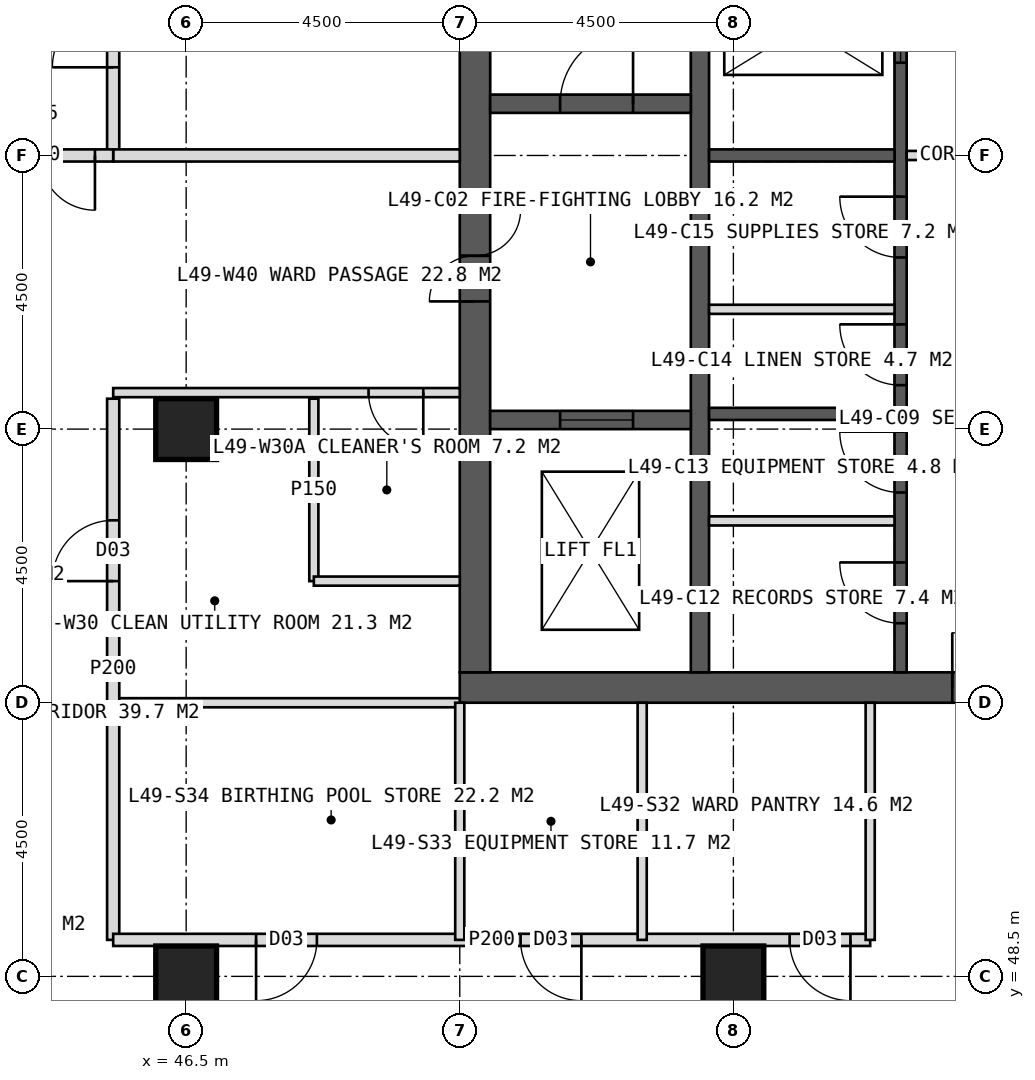
"""IFC4 building model, lengths in metres.
Left out: names, types, materials, properties, quantities, classifications, styles, units other than length and angle.
Written with IfcOpenShell. Run it as: python <this file> out.ifc"""

import sys

from ifc_helpers import new_model, si_unit, direction, frame, frame_2d, origin, origin_2d, place, context, subcontext, project, spatial, rectangle, hollow_rectangle, extrude, element, fill, save


model = new_model("IFC4")
c1 = context("Model", 3, precision=1e-05, world=origin(), true_north=direction((0.0, 1.0)))
c2 = subcontext(c1, "Body", "Model", "MODEL_VIEW")
j1 = project(units=[si_unit("LENGTHUNIT", "METRE"), si_unit("PLANEANGLEUNIT", "RADIAN")], contexts=[c1])
p1 = place(None, origin())
s1 = spatial("IfcSite", under=j1, at=p1, CompositionType="ELEMENT")
p2 = place(p1, origin())
s2 = spatial("IfcBuilding", under=s1, at=p2, CompositionType="ELEMENT")
p3 = place(p2, frame((0.0, 0.0, 205.0)))
s3 = spatial("IfcBuildingStorey", under=s2, at=p3, CompositionType="ELEMENT", Elevation=205.0)
p4 = place(p3, frame((51.0, 53.25, 0.0), z_axis=(0.0, 0.0, 1.0), x_axis=(1.0, 0.0, 0.0)))
e1 = element("IfcWall", 1, at=p4, inside=s3, PredefinedType="SHEAR", context=c2, shape_type="SweptSolid", body=[
    extrude(rectangle(XDim=18.0, YDim=0.5, at=frame_2d((9.0, 0.0))), origin(), (0.0, 0.0, 1.0), 4.0),
])
p5 = place(p4, frame((8.1, 0.0, 0.0)))
e2 = element("IfcOpeningElement", 2, at=p5, cuts=e1, PredefinedType="OPENING", context=c2, shape_type="SweptSolid", body=[
    extrude(rectangle(XDim=1.8, YDim=2.2, at=frame_2d((0.9, 1.1))), frame((0.0, 0.26, 0.0), z_axis=(0.0, -1.0, 0.0), x_axis=(1.0, 0.0, 0.0)), (0.0, 0.0, 1.0), 0.52),
])
p6 = place(p3, frame((51.25, 53.5, 0.0), z_axis=(0.0, 0.0, 1.0), x_axis=(0.0, 1.0, 0.0)))
e3 = element("IfcWall", 3, at=p6, inside=s3, PredefinedType="SHEAR", context=c2, shape_type="SweptSolid", body=[
    extrude(rectangle(XDim=17.0, YDim=0.5, at=frame_2d((8.5, 0.0))), origin(), (0.0, 0.0, 1.0), 4.0),
])
p7 = place(p6, frame((6.1, 0.0, 0.0)))
e4 = element("IfcOpeningElement", 4, at=p7, cuts=e3, PredefinedType="OPENING", context=c2, shape_type="SweptSolid", body=[
    extrude(rectangle(XDim=1.5, YDim=2.2, at=frame_2d((0.75, 1.1))), frame((0.0, 0.26, 0.0), z_axis=(0.0, -1.0, 0.0), x_axis=(1.0, 0.0, 0.0)), (0.0, 0.0, 1.0), 0.52),
])
p8 = place(p3, frame((54.95, 53.5, 0.0), z_axis=(0.0, 0.0, 1.0), x_axis=(0.0, 1.0, 0.0)))
e5 = element("IfcWall", 5, at=p8, inside=s3, PredefinedType="SHEAR", context=c2, shape_type="SweptSolid", body=[
    extrude(rectangle(XDim=17.0, YDim=0.3, at=frame_2d((8.5, 0.0))), origin(), (0.0, 0.0, 1.0), 4.0),
])
p9 = place(p3, frame((58.25, 53.5, 0.0), z_axis=(0.0, 0.0, 1.0), x_axis=(0.0, 1.0, 0.0)))
e6 = element("IfcWall", 6, at=p9, inside=s3, PredefinedType="SHEAR", context=c2, shape_type="SweptSolid", body=[
    extrude(rectangle(XDim=17.0, YDim=0.2, at=frame_2d((8.5, 0.0))), origin(), (0.0, 0.0, 1.0), 4.0),
])
p10 = place(p9, frame((0.808, 0.0, 0.0)))
e7 = element("IfcOpeningElement", 7, at=p10, cuts=e6, PredefinedType="OPENING", context=c2, shape_type="SweptSolid", body=[
    extrude(rectangle(XDim=1.0, YDim=2.1, at=frame_2d((0.5, 1.05))), frame((0.0, 0.11, 0.0), z_axis=(0.0, -1.0, 0.0), x_axis=(1.0, 0.0, 0.0)), (0.0, 0.0, 1.0), 0.22),
])
p11 = place(p9, frame((2.958, 0.0, 0.0)))
e8 = element("IfcOpeningElement", 8, at=p11, cuts=e6, PredefinedType="OPENING", context=c2, shape_type="SweptSolid", body=[
    extrude(rectangle(XDim=1.0, YDim=2.1, at=frame_2d((0.5, 1.05))), frame((0.0, 0.11, 0.0), z_axis=(0.0, -1.0, 0.0), x_axis=(1.0, 0.0, 0.0)), (0.0, 0.0, 1.0), 0.22),
])
p12 = place(p9, frame((4.722, 0.0, 0.0)))
e9 = element("IfcOpeningElement", 9, at=p12, cuts=e6, PredefinedType="OPENING", context=c2, shape_type="SweptSolid", body=[
    extrude(rectangle(XDim=1.0, YDim=2.1, at=frame_2d((0.5, 1.05))), frame((0.0, 0.11, 0.0), z_axis=(0.0, -1.0, 0.0), x_axis=(1.0, 0.0, 0.0)), (0.0, 0.0, 1.0), 0.22),
])
p13 = place(p9, frame((6.823, 0.0, 0.0)))
e10 = element("IfcOpeningElement", 10, at=p13, cuts=e6, PredefinedType="OPENING", context=c2, shape_type="SweptSolid", body=[
    extrude(rectangle(XDim=1.0, YDim=2.1, at=frame_2d((0.5, 1.05))), frame((0.0, 0.11, 0.0), z_axis=(0.0, -1.0, 0.0), x_axis=(1.0, 0.0, 0.0)), (0.0, 0.0, 1.0), 0.22),
])
p14 = place(p9, frame((10.025, 0.0, 0.0)))
e11 = element("IfcOpeningElement", 11, at=p14, cuts=e6, PredefinedType="OPENING", context=c2, shape_type="SweptSolid", body=[
    extrude(rectangle(XDim=1.4, YDim=2.2, at=frame_2d((0.7, 1.1))), frame((0.0, 0.11, 0.0), z_axis=(0.0, -1.0, 0.0), x_axis=(1.0, 0.0, 0.0)), (0.0, 0.0, 1.0), 0.22),
])
p15 = place(p9, frame((14.325, 0.0, 0.0)))
e12 = element("IfcOpeningElement", 12, at=p15, cuts=e6, PredefinedType="OPENING", context=c2, shape_type="SweptSolid", body=[
    extrude(rectangle(XDim=1.4, YDim=2.2, at=frame_2d((0.7, 1.1))), frame((0.0, 0.11, 0.0), z_axis=(0.0, -1.0, 0.0), x_axis=(1.0, 0.0, 0.0)), (0.0, 0.0, 1.0), 0.22),
])
for number, where, z_axis, x_axis in (
    (13, (55.1, 57.75, 0.0), (0.0, 0.0, 1.0), (1.0, 0.0, 0.0)),
    (14, (55.1, 62.0, 0.0), (0.0, 0.0, 1.0), (1.0, 0.0, 0.0)),
):
    element("IfcWall", number, at=place(p3, frame(where, z_axis=z_axis, x_axis=x_axis)), inside=s3, PredefinedType="SHEAR", context=c2, shape_type="SweptSolid", body=[
        extrude(rectangle(XDim=3.05, YDim=0.2, at=frame_2d((1.525, 0.0))), origin(), (0.0, 0.0, 1.0), 4.0),
    ])
p16 = place(p3, frame((51.5, 62.85, 0.0), z_axis=(0.0, 0.0, 1.0), x_axis=(1.0, 0.0, 0.0)))
e15 = element("IfcWall", 15, at=p16, inside=s3, PredefinedType="SHEAR", context=c2, shape_type="SweptSolid", body=[
    extrude(rectangle(XDim=3.3, YDim=0.3, at=frame_2d((1.65, 0.0))), origin(), (0.0, 0.0, 1.0), 4.0),
])
p17 = place(p16, frame((1.15, 0.0, 0.0)))
e16 = element("IfcOpeningElement", 16, at=p17, cuts=e15, PredefinedType="OPENING", context=c2, shape_type="SweptSolid", body=[
    extrude(rectangle(XDim=1.2, YDim=2.1, at=frame_2d((0.6, 1.05))), frame((0.0, 0.16, 0.0), z_axis=(0.0, -1.0, 0.0), x_axis=(1.0, 0.0, 0.0)), (0.0, 0.0, 1.0), 0.32),
])
p18 = place(p3, frame((51.5, 57.65, 0.0), z_axis=(0.0, 0.0, 1.0), x_axis=(1.0, 0.0, 0.0)))
e17 = element("IfcWall", 17, at=p18, inside=s3, PredefinedType="SHEAR", context=c2, shape_type="SweptSolid", body=[
    extrude(rectangle(XDim=3.3, YDim=0.3, at=frame_2d((1.65, 0.0))), origin(), (0.0, 0.0, 1.0), 4.0),
])
p19 = place(p18, frame((1.15, 0.0, 0.0)))
e18 = element("IfcOpeningElement", 18, at=p19, cuts=e17, PredefinedType="OPENING", context=c2, shape_type="SweptSolid", body=[
    extrude(rectangle(XDim=1.2, YDim=2.2, at=frame_2d((0.6, 1.1))), frame((0.0, 0.16, 0.0), z_axis=(0.0, -1.0, 0.0), x_axis=(1.0, 0.0, 0.0)), (0.0, 0.0, 1.0), 0.32),
])
for number, where, z_axis, x_axis in (
    (19, (46.5, 48.5, 0.0), (0.0, 0.0, 1.0), (1.0, 0.0, 0.0)),
    (20, (55.5, 48.5, 0.0), (0.0, 0.0, 1.0), (1.0, 0.0, 0.0)),
    (21, (46.5, 57.5, 0.0), (0.0, 0.0, 1.0), (1.0, 0.0, 0.0)),
):
    element("IfcColumn", number, at=place(p3, frame(where, z_axis=z_axis, x_axis=x_axis)), inside=s3, PredefinedType="COLUMN", context=c2, shape_type="SweptSolid", body=[
        extrude(hollow_rectangle(XDim=1.0, YDim=1.0, WallThickness=0.1, at=origin_2d()), origin(), (0.0, 0.0, 1.0), 4.0),
    ])
p20 = place(p3, frame((51.0, 53.0, 0.0), z_axis=(0.0, 0.0, 1.0), x_axis=(-1.0, 0.0, 0.0)))
e22 = element("IfcWall", 22, at=p20, inside=s3, PredefinedType="PARTITIONING", context=c2, shape_type="SweptSolid", body=[
    extrude(rectangle(XDim=5.7, YDim=0.15, at=frame_2d((2.85, 0.0))), origin(), (0.0, 0.0, 1.0), 3.75),
])
p21 = place(p3, frame((45.3, 49.1, 0.0), z_axis=(0.0, 0.0, 1.0), x_axis=(0.0, 1.0, 0.0)))
e23 = element("IfcWall", 23, at=p21, inside=s3, PredefinedType="PARTITIONING", context=c2, shape_type="SweptSolid", body=[
    extrude(rectangle(XDim=8.9, YDim=0.2, at=frame_2d((4.45, 0.0))), origin(), (0.0, 0.0, 1.0), 3.75),
])
p22 = place(p21, frame((5.9, 0.0, 0.0)))
e24 = element("IfcOpeningElement", 24, at=p22, cuts=e23, PredefinedType="OPENING", context=c2, shape_type="SweptSolid", body=[
    extrude(rectangle(XDim=1.0, YDim=2.1, at=frame_2d((0.5, 1.05))), frame((0.0, 0.11, 0.0), z_axis=(0.0, -1.0, 0.0), x_axis=(1.0, 0.0, 0.0)), (0.0, 0.0, 1.0), 0.22),
])
p23 = place(p3, frame((45.3, 62.0, 0.0), z_axis=(0.0, 0.0, 1.0), x_axis=(0.0, 1.0, 0.0)))
e25 = element("IfcWall", 25, at=p23, inside=s3, PredefinedType="PARTITIONING", context=c2, shape_type="SweptSolid", body=[
    extrude(rectangle(XDim=14.7, YDim=0.2, at=frame_2d((7.35, 0.0))), origin(), (0.0, 0.0, 1.0), 3.75),
])
p24 = place(p23, frame((1.45, 0.0, 0.0)))
e26 = element("IfcOpeningElement", 26, at=p24, cuts=e25, PredefinedType="OPENING", context=c2, shape_type="SweptSolid", body=[
    extrude(rectangle(XDim=1.0, YDim=2.1, at=frame_2d((0.5, 1.05))), frame((0.0, 0.11, 0.0), z_axis=(0.0, -1.0, 0.0), x_axis=(1.0, 0.0, 0.0)), (0.0, 0.0, 1.0), 0.22),
])
p25 = place(p23, frame((11.35, 0.0, 0.0)))
e27 = element("IfcOpeningElement", 27, at=p25, cuts=e25, PredefinedType="OPENING", context=c2, shape_type="SweptSolid", body=[
    extrude(rectangle(XDim=1.0, YDim=2.1, at=frame_2d((0.5, 1.05))), frame((0.0, 0.11, 0.0), z_axis=(0.0, -1.0, 0.0), x_axis=(1.0, 0.0, 0.0)), (0.0, 0.0, 1.0), 0.22),
])
p26 = place(p3, frame((51.0, 58.1, 0.0), z_axis=(0.0, 0.0, 1.0), x_axis=(-1.0, 0.0, 0.0)))
e28 = element("IfcWall", 28, at=p26, inside=s3, PredefinedType="PARTITIONING", context=c2, shape_type="SweptSolid", body=[
    extrude(rectangle(XDim=5.7, YDim=0.15, at=frame_2d((2.85, 0.0))), origin(), (0.0, 0.0, 1.0), 3.75),
])
p27 = place(p26, frame((0.6, 0.0, 0.0)))
e29 = element("IfcOpeningElement", 29, at=p27, cuts=e28, PredefinedType="OPENING", context=c2, shape_type="SweptSolid", body=[
    extrude(rectangle(XDim=0.9, YDim=2.1, at=frame_2d((0.45, 1.05))), frame((0.0, 0.085, 0.0), z_axis=(0.0, -1.0, 0.0), x_axis=(1.0, 0.0, 0.0)), (0.0, 0.0, 1.0), 0.17),
])
p28 = place(p3, frame((51.0, 62.0, 0.0), z_axis=(0.0, 0.0, 1.0), x_axis=(-1.0, 0.0, 0.0)))
e30 = element("IfcWall", 30, at=p28, inside=s3, PredefinedType="SOLIDWALL", context=c2, shape_type="SweptSolid", body=[
    extrude(rectangle(XDim=5.7, YDim=0.2, at=frame_2d((2.85, 0.0))), origin(), (0.0, 0.0, 1.0), 2.95),
])
p29 = place(p3, frame((48.6, 55.0, 0.0), z_axis=(0.0, 0.0, 1.0), x_axis=(0.0, 1.0, 0.0)))
e31 = element("IfcWall", 31, at=p29, inside=s3, PredefinedType="PARTITIONING", context=c2, shape_type="SweptSolid", body=[
    extrude(rectangle(XDim=3.0, YDim=0.15, at=frame_2d((1.5, 0.0))), origin(), (0.0, 0.0, 1.0), 3.75),
])
p30 = place(p3, frame((51.0, 55.0, 0.0), z_axis=(0.0, 0.0, 1.0), x_axis=(-1.0, 0.0, 0.0)))
e32 = element("IfcWall", 32, at=p30, inside=s3, PredefinedType="PARTITIONING", context=c2, shape_type="SweptSolid", body=[
    extrude(rectangle(XDim=2.4, YDim=0.15, at=frame_2d((1.2, 0.0))), origin(), (0.0, 0.0, 1.0), 3.75),
])
p31 = place(p3, frame((57.75, 49.1, 0.0), z_axis=(0.0, 0.0, 1.0), x_axis=(-1.0, 0.0, 0.0)))
e33 = element("IfcWall", 33, at=p31, inside=s3, PredefinedType="PARTITIONING", context=c2, shape_type="SweptSolid", body=[
    extrude(rectangle(XDim=12.45, YDim=0.2, at=frame_2d((6.225, 0.0))), origin(), (0.0, 0.0, 1.0), 3.75),
])
p32 = place(p31, frame((0.325, 0.0, 0.0)))
e34 = element("IfcOpeningElement", 34, at=p32, cuts=e33, PredefinedType="OPENING", context=c2, shape_type="SweptSolid", body=[
    extrude(rectangle(XDim=1.0, YDim=2.1, at=frame_2d((0.5, 1.05))), frame((0.0, 0.11, 0.0), z_axis=(0.0, -1.0, 0.0), x_axis=(1.0, 0.0, 0.0)), (0.0, 0.0, 1.0), 0.22),
])
p33 = place(p31, frame((4.75, 0.0, 0.0)))
e35 = element("IfcOpeningElement", 35, at=p33, cuts=e33, PredefinedType="OPENING", context=c2, shape_type="SweptSolid", body=[
    extrude(rectangle(XDim=1.0, YDim=2.1, at=frame_2d((0.5, 1.05))), frame((0.0, 0.11, 0.0), z_axis=(0.0, -1.0, 0.0), x_axis=(1.0, 0.0, 0.0)), (0.0, 0.0, 1.0), 0.22),
])
p34 = place(p31, frame((9.1, 0.0, 0.0)))
e36 = element("IfcOpeningElement", 36, at=p34, cuts=e33, PredefinedType="OPENING", context=c2, shape_type="SweptSolid", body=[
    extrude(rectangle(XDim=1.0, YDim=2.1, at=frame_2d((0.5, 1.05))), frame((0.0, 0.11, 0.0), z_axis=(0.0, -1.0, 0.0), x_axis=(1.0, 0.0, 0.0)), (0.0, 0.0, 1.0), 0.22),
])
for number, where, z_axis, x_axis in (
    (37, (57.75, 53.0, 0.0), (0.0, 0.0, 1.0), (0.0, -1.0, 0.0)),
    (38, (54.0, 53.0, 0.0), (0.0, 0.0, 1.0), (0.0, -1.0, 0.0)),
    (39, (51.0, 53.0, 0.0), (0.0, 0.0, 1.0), (0.0, -1.0, 0.0)),
):
    element("IfcWall", number, at=place(p3, frame(where, z_axis=z_axis, x_axis=x_axis)), inside=s3, PredefinedType="PARTITIONING", context=c2, shape_type="SweptSolid", body=[
        extrude(rectangle(XDim=3.9, YDim=0.15, at=frame_2d((1.95, 0.0))), origin(), (0.0, 0.0, 1.0), 3.75),
    ])
p35 = place(p3, frame((45.3, 62.0, 0.0), z_axis=(0.0, 0.0, 1.0), x_axis=(-1.0, 0.0, 0.0)))
e40 = element("IfcWall", 40, at=p35, inside=s3, PredefinedType="SOLIDWALL", context=c2, shape_type="SweptSolid", body=[
    extrude(rectangle(XDim=2.7, YDim=0.2, at=frame_2d((1.35, 0.0))), origin(), (0.0, 0.0, 1.0), 2.95),
])
p36 = place(p35, frame((0.3, 0.0, 0.0)))
e41 = element("IfcOpeningElement", 41, at=p36, cuts=e40, PredefinedType="OPENING", context=c2, shape_type="SweptSolid", body=[
    extrude(rectangle(XDim=1.8, YDim=2.2, at=frame_2d((0.9, 1.1))), frame((0.0, 0.11, 0.0), z_axis=(0.0, -1.0, 0.0), x_axis=(1.0, 0.0, 0.0)), (0.0, 0.0, 1.0), 0.22),
])
for number, where, z_axis, x_axis in (
    (42, (55.1, 55.99, 0.0), (0.0, 0.0, 1.0), (1.0, 0.0, 0.0)),
    (43, (55.1, 59.47, 0.0), (0.0, 0.0, 1.0), (1.0, 0.0, 0.0)),
):
    element("IfcWall", number, at=place(p3, frame(where, z_axis=z_axis, x_axis=x_axis)), inside=s3, PredefinedType="PARTITIONING", context=c2, shape_type="SweptSolid", body=[
        extrude(rectangle(XDim=3.05, YDim=0.15, at=frame_2d((1.525, 0.0))), origin(), (0.0, 0.0, 1.0), 3.75),
    ])
p37 = place(p3, frame((58.35, 62.0, 0.0), z_axis=(0.0, 0.0, 1.0), x_axis=(1.0, 0.0, 0.0)))
e44 = element("IfcWall", 44, at=p37, inside=s3, PredefinedType="PARTITIONING", context=c2, shape_type="SweptSolid", body=[
    extrude(rectangle(XDim=3.3, YDim=0.15, at=frame_2d((1.65, 0.0))), origin(), (0.0, 0.0, 1.0), 3.75),
])
p38 = place(p27, origin())
e45 = element("IfcDoor", 45, at=p38, inside=s3, OperationType="SINGLE_SWING_LEFT", PredefinedType="DOOR", context=c2, shape_type="SweptSolid", body=[
    extrude(rectangle(XDim=0.9, YDim=2.1, at=frame_2d((0.45, 1.05))), frame((0.0, 0.025, 0.0), z_axis=(0.0, -1.0, 0.0), x_axis=(1.0, 0.0, 0.0)), (0.0, 0.0, 1.0), 0.05),
])
fill(e29, e45)
p39 = place(p22, origin())
e46 = element("IfcDoor", 46, at=p39, inside=s3, OperationType="SINGLE_SWING_LEFT", PredefinedType="DOOR", context=c2, shape_type="SweptSolid", body=[
    extrude(rectangle(XDim=1.0, YDim=2.1, at=frame_2d((0.5, 1.05))), frame((0.0, 0.025, 0.0), z_axis=(0.0, -1.0, 0.0), x_axis=(1.0, 0.0, 0.0)), (0.0, 0.0, 1.0), 0.05),
])
fill(e24, e46)
p40 = place(p24, origin())
e47 = element("IfcDoor", 47, at=p40, inside=s3, OperationType="SINGLE_SWING_LEFT", PredefinedType="DOOR", context=c2, shape_type="SweptSolid", body=[
    extrude(rectangle(XDim=1.0, YDim=2.1, at=frame_2d((0.5, 1.05))), frame((0.0, 0.025, 0.0), z_axis=(0.0, -1.0, 0.0), x_axis=(1.0, 0.0, 0.0)), (0.0, 0.0, 1.0), 0.05),
])
fill(e26, e47)
p41 = place(p32, origin())
e48 = element("IfcDoor", 48, at=p41, inside=s3, OperationType="SINGLE_SWING_LEFT", PredefinedType="DOOR", context=c2, shape_type="SweptSolid", body=[
    extrude(rectangle(XDim=1.0, YDim=2.1, at=frame_2d((0.5, 1.05))), frame((0.0, 0.025, 0.0), z_axis=(0.0, -1.0, 0.0), x_axis=(1.0, 0.0, 0.0)), (0.0, 0.0, 1.0), 0.05),
])
fill(e34, e48)
p42 = place(p33, origin())
e49 = element("IfcDoor", 49, at=p42, inside=s3, OperationType="SINGLE_SWING_LEFT", PredefinedType="DOOR", context=c2, shape_type="SweptSolid", body=[
    extrude(rectangle(XDim=1.0, YDim=2.1, at=frame_2d((0.5, 1.05))), frame((0.0, 0.025, 0.0), z_axis=(0.0, -1.0, 0.0), x_axis=(1.0, 0.0, 0.0)), (0.0, 0.0, 1.0), 0.05),
])
fill(e35, e49)
p43 = place(p34, origin())
e50 = element("IfcDoor", 50, at=p43, inside=s3, OperationType="SINGLE_SWING_RIGHT", PredefinedType="DOOR", context=c2, shape_type="SweptSolid", body=[
    extrude(rectangle(XDim=1.0, YDim=2.1, at=frame_2d((0.5, 1.05))), frame((0.0, 0.025, 0.0), z_axis=(0.0, -1.0, 0.0), x_axis=(1.0, 0.0, 0.0)), (0.0, 0.0, 1.0), 0.05),
])
fill(e36, e50)
p44 = place(p36, origin())
e51 = element("IfcDoor", 51, at=p44, inside=s3, OperationType="DOUBLE_DOOR_DOUBLE_SWING", PredefinedType="DOOR", context=c2, shape_type="SweptSolid", body=[
    extrude(rectangle(XDim=1.8, YDim=2.2, at=frame_2d((0.9, 1.1))), frame((0.0, 0.025, 0.0), z_axis=(0.0, -1.0, 0.0), x_axis=(1.0, 0.0, 0.0)), (0.0, 0.0, 1.0), 0.05),
])
fill(e41, e51)
p45 = place(p7, origin())
e52 = element("IfcDoor", 52, at=p45, inside=s3, OperationType="DOUBLE_DOOR_SINGLE_SWING", PredefinedType="DOOR", context=c2, shape_type="SweptSolid", body=[
    extrude(rectangle(XDim=1.5, YDim=2.2, at=frame_2d((0.75, 1.1))), frame((0.0, 0.025, 0.0), z_axis=(0.0, -1.0, 0.0), x_axis=(1.0, 0.0, 0.0)), (0.0, 0.0, 1.0), 0.05),
])
fill(e4, e52)
p46 = place(p17, origin())
e53 = element("IfcDoor", 53, at=p46, inside=s3, OperationType="SINGLE_SWING_RIGHT", PredefinedType="DOOR", context=c2, shape_type="SweptSolid", body=[
    extrude(rectangle(XDim=1.2, YDim=2.1, at=frame_2d((0.6, 1.05))), frame((0.0, 0.025, 0.0), z_axis=(0.0, -1.0, 0.0), x_axis=(1.0, 0.0, 0.0)), (0.0, 0.0, 1.0), 0.05),
])
fill(e16, e53)
p47 = place(p19, origin())
e54 = element("IfcDoor", 54, at=p47, inside=s3, OperationType="SLIDING_TO_LEFT", PredefinedType="DOOR", context=c2, shape_type="SweptSolid", body=[
    extrude(rectangle(XDim=1.2, YDim=2.2, at=frame_2d((0.6, 1.1))), frame((0.0, 0.025, 0.0), z_axis=(0.0, -1.0, 0.0), x_axis=(1.0, 0.0, 0.0)), (0.0, 0.0, 1.0), 0.05),
])
fill(e18, e54)
p48 = place(p10, origin())
e55 = element("IfcDoor", 55, at=p48, inside=s3, OperationType="SINGLE_SWING_RIGHT", PredefinedType="DOOR", context=c2, shape_type="SweptSolid", body=[
    extrude(rectangle(XDim=1.0, YDim=2.1, at=frame_2d((0.5, 1.05))), frame((0.0, 0.025, 0.0), z_axis=(0.0, -1.0, 0.0), x_axis=(1.0, 0.0, 0.0)), (0.0, 0.0, 1.0), 0.05),
])
fill(e7, e55)
p49 = place(p11, origin())
e56 = element("IfcDoor", 56, at=p49, inside=s3, OperationType="SINGLE_SWING_RIGHT", PredefinedType="DOOR", context=c2, shape_type="SweptSolid", body=[
    extrude(rectangle(XDim=1.0, YDim=2.1, at=frame_2d((0.5, 1.05))), frame((0.0, 0.025, 0.0), z_axis=(0.0, -1.0, 0.0), x_axis=(1.0, 0.0, 0.0)), (0.0, 0.0, 1.0), 0.05),
])
fill(e8, e56)
p50 = place(p12, origin())
e57 = element("IfcDoor", 57, at=p50, inside=s3, OperationType="SINGLE_SWING_RIGHT", PredefinedType="DOOR", context=c2, shape_type="SweptSolid", body=[
    extrude(rectangle(XDim=1.0, YDim=2.1, at=frame_2d((0.5, 1.05))), frame((0.0, 0.025, 0.0), z_axis=(0.0, -1.0, 0.0), x_axis=(1.0, 0.0, 0.0)), (0.0, 0.0, 1.0), 0.05),
])
fill(e9, e57)
p51 = place(p13, origin())
e58 = element("IfcDoor", 58, at=p51, inside=s3, OperationType="SINGLE_SWING_RIGHT", PredefinedType="DOOR", context=c2, shape_type="SweptSolid", body=[
    extrude(rectangle(XDim=1.0, YDim=2.1, at=frame_2d((0.5, 1.05))), frame((0.0, 0.025, 0.0), z_axis=(0.0, -1.0, 0.0), x_axis=(1.0, 0.0, 0.0)), (0.0, 0.0, 1.0), 0.05),
])
fill(e10, e58)
p52 = place(p14, origin())
e59 = element("IfcDoor", 59, at=p52, inside=s3, OperationType="SLIDING_TO_LEFT", PredefinedType="DOOR", context=c2, shape_type="SweptSolid", body=[
    extrude(rectangle(XDim=1.4, YDim=2.2, at=frame_2d((0.7, 1.1))), frame((0.0, 0.025, 0.0), z_axis=(0.0, -1.0, 0.0), x_axis=(1.0, 0.0, 0.0)), (0.0, 0.0, 1.0), 0.05),
])
fill(e11, e59)
p53 = place(p5, origin())
e60 = element("IfcDoor", 60, at=p53, inside=s3, OperationType="DOUBLE_DOOR_SINGLE_SWING", PredefinedType="DOOR", context=c2, shape_type="SweptSolid", body=[
    extrude(rectangle(XDim=1.8, YDim=2.2, at=frame_2d((0.9, 1.1))), frame((0.0, 0.025, 0.0), z_axis=(0.0, -1.0, 0.0), x_axis=(1.0, 0.0, 0.0)), (0.0, 0.0, 1.0), 0.05),
])
fill(e2, e60)
save(model, sys.argv[1])
